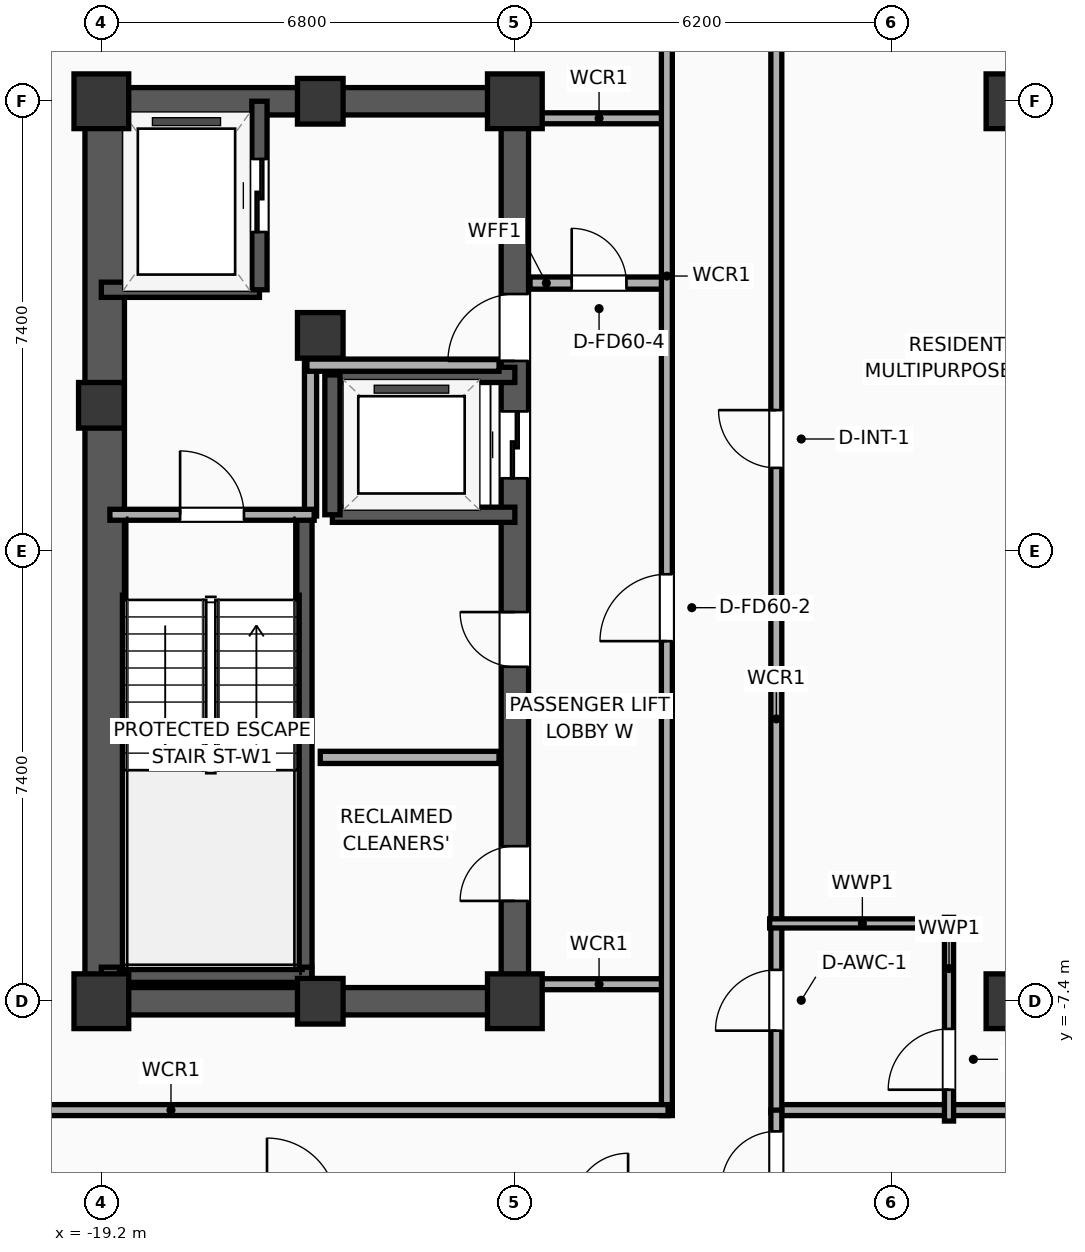
"""IFC4 building model, lengths in metres.
Left out: names, types, materials, properties, quantities, classifications, styles, units other than length and angle.
Written with IfcOpenShell. Run it as: python <this file> out.ifc"""

import sys

from ifc_helpers import new_model, si_unit, direction, frame, frame_2d, origin, origin_2d, place, context, subcontext, project, spatial, rectangle, extrude, element, fill, save


model = new_model("IFC4")
c1 = context("Model", 3, precision=1e-05, world=origin(), true_north=direction((0.0, 1.0)))
c2 = subcontext(c1, "Body", "Model", "MODEL_VIEW")
j1 = project(units=[si_unit("LENGTHUNIT", "METRE"), si_unit("PLANEANGLEUNIT", "RADIAN")], contexts=[c1])
p1 = place(None, origin())
s1 = spatial("IfcSite", under=j1, at=p1, CompositionType="ELEMENT")
p2 = place(p1, origin())
s2 = spatial("IfcBuilding", under=s1, at=p2, CompositionType="ELEMENT")
p3 = place(p2, frame((0.0, 0.0, 219.7)))
s3 = spatial("IfcBuildingStorey", under=s2, at=p3, CompositionType="ELEMENT", Elevation=219.7)
p4 = place(p3, frame((-19.2, -7.4, 0.0), z_axis=(0.0, 0.0, 1.0), x_axis=(1.0, 0.0, 0.0)))
e1 = element("IfcColumn", 1, at=p4, inside=s3, PredefinedType="COLUMN", context=c2, shape_type="SweptSolid", body=[
    extrude(rectangle(XDim=0.9, YDim=0.9, at=origin_2d()), origin(), (0.0, 0.0, 1.0), 3.9),
])
p5 = place(p3, frame((-19.2, 2.4, 0.0), z_axis=(0.0, 0.0, 1.0), x_axis=(1.0, 0.0, 0.0)))
e2 = element("IfcColumn", 2, at=p5, inside=s3, PredefinedType="COLUMN", context=c2, shape_type="SweptSolid", body=[
    extrude(rectangle(XDim=0.75, YDim=0.75, at=origin_2d()), origin(), (0.0, 0.0, 1.0), 3.9),
])
p6 = place(p3, frame((-19.2, 7.4, 0.0), z_axis=(0.0, 0.0, 1.0), x_axis=(1.0, 0.0, 0.0)))
e3 = element("IfcColumn", 3, at=p6, inside=s3, PredefinedType="COLUMN", context=c2, shape_type="SweptSolid", body=[
    extrude(rectangle(XDim=0.9, YDim=0.9, at=origin_2d()), origin(), (0.0, 0.0, 1.0), 3.9),
])
for number, where, z_axis, x_axis in (
    (4, (-15.6, -7.4, 0.0), (0.0, 0.0, 1.0), (1.0, 0.0, 0.0)),
    (5, (-15.6, 7.4, 0.0), (0.0, 0.0, 1.0), (1.0, 0.0, 0.0)),
):
    element("IfcColumn", number, at=place(p3, frame(where, z_axis=z_axis, x_axis=x_axis)), inside=s3, PredefinedType="COLUMN", context=c2, shape_type="SweptSolid", body=[
        extrude(rectangle(XDim=0.75, YDim=0.75, at=origin_2d()), origin(), (0.0, 0.0, 1.0), 3.9),
    ])
p7 = place(p3, frame((-12.4, -7.4, 0.0), z_axis=(0.0, 0.0, 1.0), x_axis=(1.0, 0.0, 0.0)))
e6 = element("IfcColumn", 6, at=p7, inside=s3, PredefinedType="COLUMN", context=c2, shape_type="SweptSolid", body=[
    extrude(rectangle(XDim=0.9, YDim=0.9, at=origin_2d()), origin(), (0.0, 0.0, 1.0), 3.9),
])
p8 = place(p3, frame((-15.6, 3.55, 0.0), z_axis=(0.0, 0.0, 1.0), x_axis=(1.0, 0.0, 0.0)))
e7 = element("IfcColumn", 7, at=p8, inside=s3, PredefinedType="COLUMN", context=c2, shape_type="SweptSolid", body=[
    extrude(rectangle(XDim=0.75, YDim=0.75, at=origin_2d()), origin(), (0.0, 0.0, 1.0), 3.9),
])
p9 = place(p3, frame((-12.4, 7.4, 0.0), z_axis=(0.0, 0.0, 1.0), x_axis=(1.0, 0.0, 0.0)))
e8 = element("IfcColumn", 8, at=p9, inside=s3, PredefinedType="COLUMN", context=c2, shape_type="SweptSolid", body=[
    extrude(rectangle(XDim=0.9, YDim=0.9, at=origin_2d()), origin(), (0.0, 0.0, 1.0), 3.9),
])
for number, where, z_axis, x_axis in (
    (9, (-19.425, -7.4, 0.0), (0.0, 0.0, 1.0), (1.0, 0.0, 0.0)),
    (10, (-19.425, 7.4, 0.0), (0.0, 0.0, 1.0), (1.0, 0.0, 0.0)),
):
    element("IfcWall", number, at=place(p3, frame(where, z_axis=z_axis, x_axis=x_axis)), inside=s3, PredefinedType="SHEAR", context=c2, shape_type="SweptSolid", body=[
        extrude(rectangle(XDim=7.25, YDim=0.45, at=frame_2d((3.625, 0.0))), origin(), (0.0, 0.0, 1.0), 3.65),
    ])
p10 = place(p3, frame((-19.145, -7.4, 0.0), z_axis=(0.0, 0.0, 1.0), x_axis=(0.0, 1.0, 0.0)))
e11 = element("IfcWall", 11, at=p10, inside=s3, PredefinedType="SHEAR", context=c2, shape_type="SweptSolid", body=[
    extrude(rectangle(XDim=14.8, YDim=0.65, at=frame_2d((7.4, 0.0))), origin(), (0.0, 0.0, 1.0), 3.65),
])
p11 = place(p3, frame((-12.4, -7.4, 0.0), z_axis=(0.0, 0.0, 1.0), x_axis=(0.0, 1.0, 0.0)))
e12 = element("IfcWall", 12, at=p11, inside=s3, PredefinedType="SHEAR", context=c2, shape_type="SweptSolid", body=[
    extrude(rectangle(XDim=14.8, YDim=0.45, at=frame_2d((7.4, 0.0))), origin(), (0.0, 0.0, 1.0), 3.65),
])
p12 = place(p11, frame((8.6, 0.0, 0.0)))
e13 = element("IfcOpeningElement", 13, at=p12, cuts=e12, PredefinedType="OPENING", context=c2, shape_type="SweptSolid", body=[
    extrude(rectangle(XDim=1.1, YDim=2.05, at=frame_2d((0.55, 1.025))), frame((0.0, 0.235, 0.0), z_axis=(0.0, -1.0, 0.0), x_axis=(1.0, 0.0, 0.0)), (0.0, 0.0, 1.0), 0.47),
])
p13 = place(p11, frame((10.53, 0.0, 0.0)))
e14 = element("IfcOpeningElement", 14, at=p13, cuts=e12, PredefinedType="OPENING", context=c2, shape_type="SweptSolid", body=[
    extrude(rectangle(XDim=1.1, YDim=2.05, at=frame_2d((0.55, 1.025))), frame((0.0, 0.235, 0.0), z_axis=(0.0, -1.0, 0.0), x_axis=(1.0, 0.0, 0.0)), (0.0, 0.0, 1.0), 0.47),
])
p14 = place(p11, frame((1.65, 0.0, 0.0)))
e15 = element("IfcOpeningElement", 15, at=p14, cuts=e12, PredefinedType="OPENING", context=c2, shape_type="SweptSolid", body=[
    extrude(rectangle(XDim=0.9, YDim=2.05, at=frame_2d((0.45, 1.025))), frame((0.0, 0.235, 0.0), z_axis=(0.0, -1.0, 0.0), x_axis=(1.0, 0.0, 0.0)), (0.0, 0.0, 1.0), 0.47),
])
p15 = place(p11, frame((5.5, 0.0, 0.0)))
e16 = element("IfcOpeningElement", 16, at=p15, cuts=e12, PredefinedType="OPENING", context=c2, shape_type="SweptSolid", body=[
    extrude(rectangle(XDim=0.9, YDim=2.05, at=frame_2d((0.45, 1.025))), frame((0.0, 0.235, 0.0), z_axis=(0.0, -1.0, 0.0), x_axis=(1.0, 0.0, 0.0)), (0.0, 0.0, 1.0), 0.47),
])
p16 = place(p3, frame((-15.86, -7.085, 0.0), z_axis=(0.0, 0.0, 1.0), x_axis=(0.0, 1.0, 0.0)))
e17 = element("IfcWall", 17, at=p16, inside=s3, PredefinedType="SOLIDWALL", context=c2, shape_type="SweptSolid", body=[
    extrude(rectangle(XDim=7.685, YDim=0.25, at=frame_2d((3.843, 0.0))), origin(), (0.0, 0.0, 1.0), 3.65),
])
p17 = place(p3, frame((-19.2, -6.965, 0.0), z_axis=(0.0, 0.0, 1.0), x_axis=(1.0, 0.0, 0.0)))
e18 = element("IfcWall", 18, at=p17, inside=s3, PredefinedType="SOLIDWALL", context=c2, shape_type="SweptSolid", body=[
    extrude(rectangle(XDim=3.46, YDim=0.25, at=frame_2d((1.73, 0.0))), origin(), (0.0, 0.0, 1.0), 3.65),
])
for number, where, z_axis, x_axis in (
    (19, (-4.2, -7.4, 0.0), (0.0, 0.0, 1.0), (1.0, 0.0, 0.0)),
    (20, (-4.2, 7.4, 0.0), (0.0, 0.0, 1.0), (1.0, 0.0, 0.0)),
):
    element("IfcColumn", number, at=place(p3, frame(where, z_axis=z_axis, x_axis=x_axis)), inside=s3, PredefinedType="COLUMN", context=c2, shape_type="SweptSolid", body=[
        extrude(rectangle(XDim=0.9, YDim=0.9, at=origin_2d()), origin(), (0.0, 0.0, 1.0), 3.9),
    ])
p18 = place(p3, frame((-19.2, 4.3, 0.0), z_axis=(0.0, 0.0, 1.0), x_axis=(1.0, 0.0, 0.0)))
e21 = element("IfcWall", 21, at=p18, inside=s3, PredefinedType="SOLIDWALL", context=c2, shape_type="SweptSolid", body=[
    extrude(rectangle(XDim=2.6, YDim=0.25, at=frame_2d((1.3, 0.0))), origin(), (0.0, 0.0, 1.0), 3.65),
])
p19 = place(p3, frame((-16.6, 4.3, 0.0), z_axis=(0.0, 0.0, 1.0), x_axis=(0.0, 1.0, 0.0)))
e22 = element("IfcWall", 22, at=p19, inside=s3, PredefinedType="SOLIDWALL", context=c2, shape_type="SweptSolid", body=[
    extrude(rectangle(XDim=3.1, YDim=0.25, at=frame_2d((1.55, 0.0))), origin(), (0.0, 0.0, 1.0), 3.65),
])
p20 = place(p19, frame((0.95, 0.0, 0.0)))
e23 = element("IfcOpeningElement", 23, at=p20, cuts=e22, PredefinedType="OPENING", context=c2, shape_type="SweptSolid", body=[
    extrude(rectangle(XDim=1.2, YDim=2.05, at=frame_2d((0.6, 1.025))), frame((0.0, 0.135, 0.0), z_axis=(0.0, -1.0, 0.0), x_axis=(1.0, 0.0, 0.0)), (0.0, 0.0, 1.0), 0.27),
])
for number, where, z_axis, x_axis in (
    (24, (-15.4, 0.6, 0.0), (0.0, 0.0, 1.0), (1.0, 0.0, 0.0)),
    (25, (-12.4, 2.9, 0.0), (0.0, 0.0, 1.0), (-1.0, 0.0, 0.0)),
):
    element("IfcWall", number, at=place(p3, frame(where, z_axis=z_axis, x_axis=x_axis)), inside=s3, PredefinedType="SOLIDWALL", context=c2, shape_type="SweptSolid", body=[
        extrude(rectangle(XDim=3.0, YDim=0.25, at=frame_2d((1.5, 0.0))), origin(), (0.0, 0.0, 1.0), 3.65),
    ])
p21 = place(p3, frame((-15.4, 2.9, 0.0), z_axis=(0.0, 0.0, 1.0), x_axis=(0.0, -1.0, 0.0)))
e26 = element("IfcWall", 26, at=p21, inside=s3, PredefinedType="SOLIDWALL", context=c2, shape_type="SweptSolid", body=[
    extrude(rectangle(XDim=2.3, YDim=0.25, at=frame_2d((1.15, 0.0))), origin(), (0.0, 0.0, 1.0), 3.65),
])
p22 = place(p3, frame((-15.76, 0.58, 0.0), z_axis=(0.0, 0.0, 1.0), x_axis=(0.0, 1.0, 0.0)))
e27 = element("IfcWall", 27, at=p22, inside=s3, PredefinedType="PARTITIONING", context=c2, shape_type="SweptSolid", body=[
    extrude(rectangle(XDim=2.52, YDim=0.2, at=frame_2d((1.26, 0.0))), origin(), (0.0, 0.0, 1.0), 3.65),
])
p23 = place(p3, frame((-15.82, 3.06, 0.0), z_axis=(0.0, 0.0, 1.0), x_axis=(1.0, 0.0, 0.0)))
e28 = element("IfcWall", 28, at=p23, inside=s3, PredefinedType="PARTITIONING", context=c2, shape_type="SweptSolid", body=[
    extrude(rectangle(XDim=3.16, YDim=0.2, at=frame_2d((1.58, 0.0))), origin(), (0.0, 0.0, 1.0), 3.65),
])
p24 = place(p3, frame((-19.06, 0.6, 0.0), z_axis=(0.0, 0.0, 1.0), x_axis=(1.0, 0.0, 0.0)))
e29 = element("IfcWall", 29, at=p24, inside=s3, PredefinedType="PARTITIONING", context=c2, shape_type="SweptSolid", body=[
    extrude(rectangle(XDim=3.36, YDim=0.18, at=frame_2d((1.68, 0.0))), origin(), (0.0, 0.0, 1.0), 3.65),
])
p25 = place(p24, frame((1.155, 0.0, 0.0)))
e30 = element("IfcOpeningElement", 30, at=p25, cuts=e29, PredefinedType="OPENING", context=c2, shape_type="SweptSolid", body=[
    extrude(rectangle(XDim=1.05, YDim=2.05, at=frame_2d((0.525, 1.025))), frame((0.0, 0.1, 0.0), z_axis=(0.0, -1.0, 0.0), x_axis=(1.0, 0.0, 0.0)), (0.0, 0.0, 1.0), 0.2),
])
p26 = place(p3, frame((-15.6, -3.39, 0.0), z_axis=(0.0, 0.0, 1.0), x_axis=(1.0, 0.0, 0.0)))
e31 = element("IfcWall", 31, at=p26, inside=s3, PredefinedType="PARTITIONING", context=c2, shape_type="SweptSolid", body=[
    extrude(rectangle(XDim=2.94, YDim=0.2, at=frame_2d((1.47, 0.0))), origin(), (0.0, 0.0, 1.0), 3.65),
])
p27 = place(p3, frame((-12.15, 4.41, 0.0), z_axis=(0.0, 0.0, 1.0), x_axis=(1.0, 0.0, 0.0)))
e32 = element("IfcWall", 32, at=p27, inside=s3, PredefinedType="PARTITIONING", context=c2, shape_type="SweptSolid", body=[
    extrude(rectangle(XDim=2.27, YDim=0.2, at=frame_2d((1.135, 0.0))), origin(), (0.0, 0.0, 1.0), 3.65),
])
p28 = place(p27, frame((0.685, 0.0, 0.0)))
e33 = element("IfcOpeningElement", 33, at=p28, cuts=e32, PredefinedType="OPENING", context=c2, shape_type="SweptSolid", body=[
    extrude(rectangle(XDim=0.9, YDim=2.05, at=frame_2d((0.45, 1.025))), frame((0.0, 0.11, 0.0), z_axis=(0.0, -1.0, 0.0), x_axis=(1.0, 0.0, 0.0)), (0.0, 0.0, 1.0), 0.22),
])
for number, where, z_axis, x_axis in (
    (34, (-12.15, 7.12, 0.0), (0.0, 0.0, 1.0), (1.0, 0.0, 0.0)),
    (35, (-12.15, -7.12, 0.0), (0.0, 0.0, 1.0), (1.0, 0.0, 0.0)),
):
    element("IfcWall", number, at=place(p3, frame(where, z_axis=z_axis, x_axis=x_axis)), inside=s3, PredefinedType="PARTITIONING", context=c2, shape_type="SweptSolid", body=[
        extrude(rectangle(XDim=2.27, YDim=0.18, at=frame_2d((1.135, 0.0))), origin(), (0.0, 0.0, 1.0), 3.65),
    ])
p29 = place(p3, frame((-9.9, -9.28, 0.0), z_axis=(0.0, 0.0, 1.0), x_axis=(0.0, 1.0, 0.0)))
e36 = element("IfcWall", 36, at=p29, inside=s3, PredefinedType="PARTITIONING", context=c2, shape_type="SweptSolid", body=[
    extrude(rectangle(XDim=18.56, YDim=0.18, at=frame_2d((9.28, 0.0))), origin(), (0.0, 0.0, 1.0), 3.65),
])
p30 = place(p29, frame((7.802, 0.0, 0.0)))
e37 = element("IfcOpeningElement", 37, at=p30, cuts=e36, PredefinedType="OPENING", context=c2, shape_type="SweptSolid", body=[
    extrude(rectangle(XDim=1.1, YDim=2.05, at=frame_2d((0.55, 1.025))), frame((0.0, 0.1, 0.0), z_axis=(0.0, -1.0, 0.0), x_axis=(1.0, 0.0, 0.0)), (0.0, 0.0, 1.0), 0.2),
])
p31 = place(p3, frame((-26.23, -9.19, 0.0), z_axis=(0.0, 0.0, 1.0), x_axis=(1.0, 0.0, 0.0)))
e38 = element("IfcWall", 38, at=p31, inside=s3, PredefinedType="PARTITIONING", context=c2, shape_type="SweptSolid", body=[
    extrude(rectangle(XDim=16.35, YDim=0.18, at=frame_2d((8.175, 0.0))), origin(), (0.0, 0.0, 1.0), 3.65),
])
p32 = place(p3, frame((-8.15, -9.19, 0.0), z_axis=(0.0, 0.0, 1.0), x_axis=(1.0, 0.0, 0.0)))
e39 = element("IfcWall", 39, at=p32, inside=s3, PredefinedType="PARTITIONING", context=c2, shape_type="SweptSolid", body=[
    extrude(rectangle(XDim=16.3, YDim=0.18, at=frame_2d((8.15, 0.0))), origin(), (0.0, 0.0, 1.0), 3.65),
])
p33 = place(p3, frame((-8.1, -9.23, 0.0), z_axis=(0.0, 0.0, 1.0), x_axis=(0.0, 1.0, 0.0)))
e40 = element("IfcWall", 40, at=p33, inside=s3, PredefinedType="PARTITIONING", context=c2, shape_type="SweptSolid", body=[
    extrude(rectangle(XDim=18.46, YDim=0.18, at=frame_2d((9.23, 0.0))), origin(), (0.0, 0.0, 1.0), 3.65),
])
p34 = place(p33, frame((1.346, 0.0, 0.0)))
e41 = element("IfcOpeningElement", 41, at=p34, cuts=e40, PredefinedType="OPENING", context=c2, shape_type="SweptSolid", body=[
    extrude(rectangle(XDim=1.0, YDim=2.05, at=frame_2d((0.5, 1.025))), frame((0.0, 0.1, 0.0), z_axis=(0.0, -1.0, 0.0), x_axis=(1.0, 0.0, 0.0)), (0.0, 0.0, 1.0), 0.2),
])
p35 = place(p33, frame((10.601, 0.0, 0.0)))
e42 = element("IfcOpeningElement", 42, at=p35, cuts=e40, PredefinedType="OPENING", context=c2, shape_type="SweptSolid", body=[
    extrude(rectangle(XDim=0.95, YDim=2.05, at=frame_2d((0.475, 1.025))), frame((0.0, 0.1, 0.0), z_axis=(0.0, -1.0, 0.0), x_axis=(1.0, 0.0, 0.0)), (0.0, 0.0, 1.0), 0.2),
])
p36 = place(p3, frame((-5.26, -9.37, 0.0), z_axis=(0.0, 0.0, 1.0), x_axis=(0.0, 1.0, 0.0)))
e43 = element("IfcWall", 43, at=p36, inside=s3, PredefinedType="PLUMBINGWALL", context=c2, shape_type="SweptSolid", body=[
    extrude(rectangle(XDim=3.35, YDim=0.15, at=frame_2d((1.675, 0.0))), origin(), (0.0, 0.0, 1.0), 3.65),
])
p37 = place(p36, frame((0.515, 0.0, 0.0)))
e44 = element("IfcOpeningElement", 44, at=p37, cuts=e43, PredefinedType="OPENING", context=c2, shape_type="SweptSolid", body=[
    extrude(rectangle(XDim=1.0, YDim=2.05, at=frame_2d((0.5, 1.025))), frame((0.0, 0.085, 0.0), z_axis=(0.0, -1.0, 0.0), x_axis=(1.0, 0.0, 0.0)), (0.0, 0.0, 1.0), 0.17),
])
p38 = place(p3, frame((-8.21, -6.12, 0.0), z_axis=(0.0, 0.0, 1.0), x_axis=(1.0, 0.0, 0.0)))
e45 = element("IfcWall", 45, at=p38, inside=s3, PredefinedType="PLUMBINGWALL", context=c2, shape_type="SweptSolid", body=[
    extrude(rectangle(XDim=3.05, YDim=0.15, at=frame_2d((1.525, 0.0))), origin(), (0.0, 0.0, 1.0), 3.65),
])
p39 = place(p3, frame((-8.1, -18.83, 0.0), z_axis=(0.0, 0.0, 1.0), x_axis=(0.0, 1.0, 0.0)))
e46 = element("IfcWall", 46, at=p39, inside=s3, PredefinedType="PARTITIONING", context=c2, shape_type="SweptSolid", body=[
    extrude(rectangle(XDim=9.64, YDim=0.18, at=frame_2d((4.82, 0.0))), origin(), (0.0, 0.0, 1.0), 3.65),
])
p40 = place(p39, frame((8.39, 0.0, 0.0)))
e47 = element("IfcOpeningElement", 47, at=p40, cuts=e46, PredefinedType="OPENING", context=c2, shape_type="SweptSolid", body=[
    extrude(rectangle(XDim=0.9, YDim=2.05, at=frame_2d((0.45, 1.025))), frame((0.0, 0.1, 0.0), z_axis=(0.0, -1.0, 0.0), x_axis=(1.0, 0.0, 0.0)), (0.0, 0.0, 1.0), 0.2),
])
p41 = place(p20, origin())
e48 = element("IfcDoor", 48, at=p41, inside=s3, OperationType="SLIDING_TO_LEFT", PredefinedType="DOOR", context=c2, shape_type="SweptSolid", body=[
    extrude(rectangle(XDim=1.2, YDim=2.05, at=frame_2d((0.6, 1.025))), frame((0.0, 0.025, 0.0), z_axis=(0.0, -1.0, 0.0), x_axis=(1.0, 0.0, 0.0)), (0.0, 0.0, 1.0), 0.05),
])
fill(e23, e48)
p42 = place(p12, origin())
e49 = element("IfcDoor", 49, at=p42, inside=s3, OperationType="SLIDING_TO_LEFT", PredefinedType="DOOR", context=c2, shape_type="SweptSolid", body=[
    extrude(rectangle(XDim=1.1, YDim=2.05, at=frame_2d((0.55, 1.025))), frame((0.0, 0.025, 0.0), z_axis=(0.0, -1.0, 0.0), x_axis=(1.0, 0.0, 0.0)), (0.0, 0.0, 1.0), 0.05),
])
fill(e13, e49)
p43 = place(p25, origin())
e50 = element("IfcDoor", 50, at=p43, inside=s3, OperationType="SINGLE_SWING_LEFT", PredefinedType="DOOR", context=c2, shape_type="SweptSolid", body=[
    extrude(rectangle(XDim=1.05, YDim=2.05, at=frame_2d((0.525, 1.025))), frame((0.0, 0.025, 0.0), z_axis=(0.0, -1.0, 0.0), x_axis=(1.0, 0.0, 0.0)), (0.0, 0.0, 1.0), 0.05),
])
fill(e30, e50)
p44 = place(p28, origin())
e51 = element("IfcDoor", 51, at=p44, inside=s3, OperationType="SINGLE_SWING_LEFT", PredefinedType="DOOR", context=c2, shape_type="SweptSolid", body=[
    extrude(rectangle(XDim=0.9, YDim=2.05, at=frame_2d((0.45, 1.025))), frame((0.0, 0.025, 0.0), z_axis=(0.0, -1.0, 0.0), x_axis=(1.0, 0.0, 0.0)), (0.0, 0.0, 1.0), 0.05),
])
fill(e33, e51)
p45 = place(p30, origin())
e52 = element("IfcDoor", 52, at=p45, inside=s3, OperationType="SINGLE_SWING_LEFT", PredefinedType="DOOR", context=c2, shape_type="SweptSolid", body=[
    extrude(rectangle(XDim=1.1, YDim=2.05, at=frame_2d((0.55, 1.025))), frame((0.0, 0.025, 0.0), z_axis=(0.0, -1.0, 0.0), x_axis=(1.0, 0.0, 0.0)), (0.0, 0.0, 1.0), 0.05),
])
fill(e37, e52)
p46 = place(p34, origin())
e53 = element("IfcDoor", 53, at=p46, inside=s3, OperationType="SINGLE_SWING_LEFT", PredefinedType="DOOR", context=c2, shape_type="SweptSolid", body=[
    extrude(rectangle(XDim=1.0, YDim=2.05, at=frame_2d((0.5, 1.025))), frame((0.0, 0.025, 0.0), z_axis=(0.0, -1.0, 0.0), x_axis=(1.0, 0.0, 0.0)), (0.0, 0.0, 1.0), 0.05),
])
fill(e41, e53)
p47 = place(p35, origin())
e54 = element("IfcDoor", 54, at=p47, inside=s3, OperationType="SINGLE_SWING_RIGHT", PredefinedType="DOOR", context=c2, shape_type="SweptSolid", body=[
    extrude(rectangle(XDim=0.95, YDim=2.05, at=frame_2d((0.475, 1.025))), frame((0.0, 0.025, 0.0), z_axis=(0.0, -1.0, 0.0), x_axis=(1.0, 0.0, 0.0)), (0.0, 0.0, 1.0), 0.05),
])
fill(e42, e54)
p48 = place(p37, origin())
e55 = element("IfcDoor", 55, at=p48, inside=s3, OperationType="SINGLE_SWING_LEFT", PredefinedType="DOOR", context=c2, shape_type="SweptSolid", body=[
    extrude(rectangle(XDim=1.0, YDim=2.05, at=frame_2d((0.5, 1.025))), frame((0.0, 0.025, 0.0), z_axis=(0.0, -1.0, 0.0), x_axis=(1.0, 0.0, 0.0)), (0.0, 0.0, 1.0), 0.05),
])
fill(e44, e55)
p49 = place(p40, origin())
e56 = element("IfcDoor", 56, at=p49, inside=s3, OperationType="SINGLE_SWING_LEFT", PredefinedType="DOOR", context=c2, shape_type="SweptSolid", body=[
    extrude(rectangle(XDim=0.9, YDim=2.05, at=frame_2d((0.45, 1.025))), frame((0.0, 0.025, 0.0), z_axis=(0.0, -1.0, 0.0), x_axis=(1.0, 0.0, 0.0)), (0.0, 0.0, 1.0), 0.05),
])
fill(e47, e56)
p50 = place(p13, origin())
e57 = element("IfcDoor", 57, at=p50, inside=s3, OperationType="SINGLE_SWING_LEFT", PredefinedType="DOOR", context=c2, shape_type="SweptSolid", body=[
    extrude(rectangle(XDim=1.1, YDim=2.05, at=frame_2d((0.55, 1.025))), frame((0.0, 0.025, 0.0), z_axis=(0.0, -1.0, 0.0), x_axis=(1.0, 0.0, 0.0)), (0.0, 0.0, 1.0), 0.05),
])
fill(e14, e57)
p51 = place(p14, origin())
e58 = element("IfcDoor", 58, at=p51, inside=s3, OperationType="SINGLE_SWING_LEFT", PredefinedType="DOOR", context=c2, shape_type="SweptSolid", body=[
    extrude(rectangle(XDim=0.9, YDim=2.05, at=frame_2d((0.45, 1.025))), frame((0.0, 0.025, 0.0), z_axis=(0.0, -1.0, 0.0), x_axis=(1.0, 0.0, 0.0)), (0.0, 0.0, 1.0), 0.05),
])
fill(e15, e58)
p52 = place(p15, origin())
e59 = element("IfcDoor", 59, at=p52, inside=s3, OperationType="SINGLE_SWING_RIGHT", PredefinedType="DOOR", context=c2, shape_type="SweptSolid", body=[
    extrude(rectangle(XDim=0.9, YDim=2.05, at=frame_2d((0.45, 1.025))), frame((0.0, 0.025, 0.0), z_axis=(0.0, -1.0, 0.0), x_axis=(1.0, 0.0, 0.0)), (0.0, 0.0, 1.0), 0.05),
])
fill(e16, e59)
save(model, sys.argv[1])
